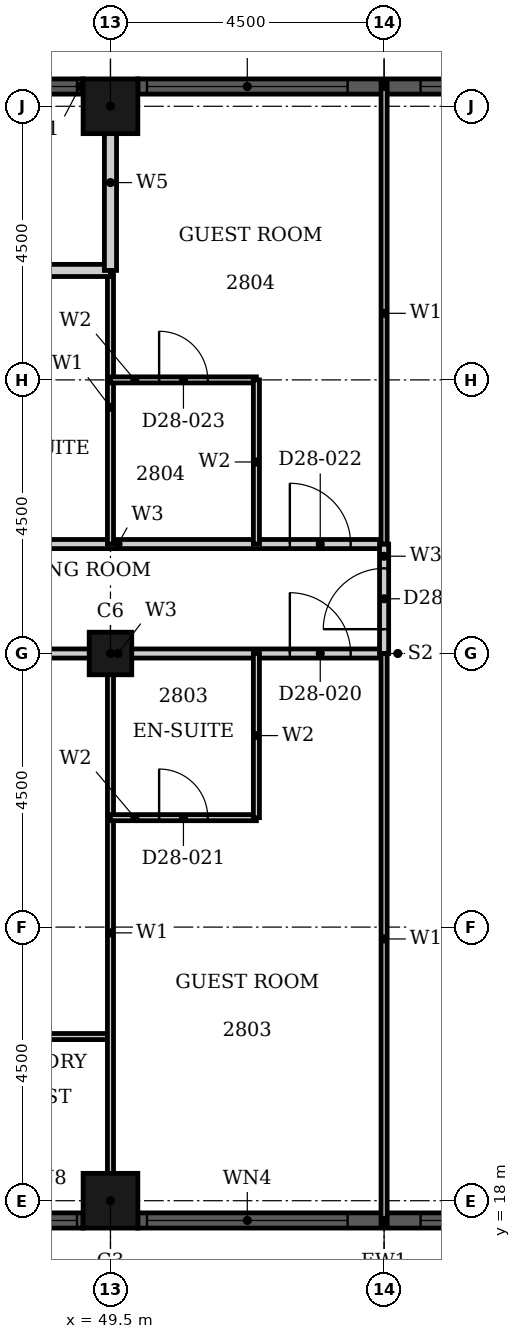
"""IFC4 building model, lengths in metres.
Left out: names, types, materials, properties, quantities, classifications, styles, units other than length and angle.
Written with IfcOpenShell. Run it as: python <this file> out.ifc"""

import sys

from ifc_helpers import new_model, si_unit, direction, frame, frame_2d, origin, origin_2d, place, context, subcontext, project, spatial, rectangle, hollow_rectangle, extrude, element, fill, save


model = new_model("IFC4")
c1 = context("Model", 3, precision=1e-05, world=origin(), true_north=direction((0.0, 1.0)))
c2 = subcontext(c1, "Body", "Model", "MODEL_VIEW")
j1 = project(units=[si_unit("LENGTHUNIT", "METRE"), si_unit("PLANEANGLEUNIT", "RADIAN")], contexts=[c1])
p1 = place(None, origin())
s1 = spatial("IfcSite", under=j1, at=p1, CompositionType="ELEMENT")
p2 = place(p1, origin())
s2 = spatial("IfcBuilding", under=s1, at=p2, CompositionType="ELEMENT")
p3 = place(p2, frame((0.0, 0.0, 115.2)))
s3 = spatial("IfcBuildingStorey", under=s2, at=p3, CompositionType="ELEMENT", Elevation=115.2)
for number, where, z_axis, x_axis in (
    (1, (49.5, 18.0, 0.0), (0.0, 0.0, 1.0), (1.0, 0.0, 0.0)),
    (2, (49.5, 36.0, 0.0), (0.0, 0.0, 1.0), (1.0, 0.0, 0.0)),
):
    element("IfcColumn", number, at=place(p3, frame(where, z_axis=z_axis, x_axis=x_axis)), inside=s3, PredefinedType="COLUMN", context=c2, shape_type="SweptSolid", body=[
        extrude(hollow_rectangle(XDim=0.9, YDim=0.9, WallThickness=0.028, at=origin_2d()), origin(), (0.0, 0.0, 1.0), 3.6),
    ])
p4 = place(p3, frame((49.5, 27.0, 0.0), z_axis=(0.0, 0.0, 1.0), x_axis=(1.0, 0.0, 0.0)))
e3 = element("IfcColumn", 3, at=p4, inside=s3, PredefinedType="COLUMN", context=c2, shape_type="SweptSolid", body=[
    extrude(hollow_rectangle(XDim=0.7, YDim=0.7, WallThickness=0.022, at=origin_2d()), origin(), (0.0, 0.0, 1.0), 3.6),
])
p5 = place(p3, frame((47.7, 17.675, 0.0), z_axis=(0.0, 0.0, 1.0), x_axis=(1.0, 0.0, 0.0)))
e4 = element("IfcWall", 4, at=p5, inside=s3, PredefinedType="SOLIDWALL", context=c2, shape_type="SweptSolid", body=[
    extrude(rectangle(XDim=1.35, YDim=0.25, at=frame_2d((0.675, 0.0))), origin(), (0.0, 0.0, 1.0), 3.6),
])
p6 = place(p5, frame((0.1, 0.0, 0.9)))
e5 = element("IfcOpeningElement", 5, at=p6, cuts=e4, PredefinedType="OPENING", context=c2, shape_type="SweptSolid", body=[
    extrude(rectangle(XDim=1.15, YDim=2.08, at=frame_2d((0.575, 1.04))), frame((0.0, 0.135, 0.0), z_axis=(0.0, -1.0, 0.0), x_axis=(1.0, 0.0, 0.0)), (0.0, 0.0, 1.0), 0.27),
])
p7 = place(p3, frame((49.95, 17.675, 0.0), z_axis=(0.0, 0.0, 1.0), x_axis=(1.0, 0.0, 0.0)))
e6 = element("IfcWall", 6, at=p7, inside=s3, PredefinedType="SOLIDWALL", context=c2, shape_type="SweptSolid", body=[
    extrude(rectangle(XDim=8.1, YDim=0.25, at=frame_2d((4.05, 0.0))), origin(), (0.0, 0.0, 1.0), 3.6),
])
p8 = place(p7, frame((0.15, 0.0, 0.9)))
e7 = element("IfcOpeningElement", 7, at=p8, cuts=e6, PredefinedType="OPENING", context=c2, shape_type="SweptSolid", body=[
    extrude(rectangle(XDim=3.3, YDim=2.08, at=frame_2d((1.65, 1.04))), frame((0.0, 0.135, 0.0), z_axis=(0.0, -1.0, 0.0), x_axis=(1.0, 0.0, 0.0)), (0.0, 0.0, 1.0), 0.27),
])
p9 = place(p7, frame((4.65, 0.0, 0.9)))
e8 = element("IfcOpeningElement", 8, at=p9, cuts=e6, PredefinedType="OPENING", context=c2, shape_type="SweptSolid", body=[
    extrude(rectangle(XDim=3.3, YDim=2.08, at=frame_2d((1.65, 1.04))), frame((0.0, 0.135, 0.0), z_axis=(0.0, -1.0, 0.0), x_axis=(1.0, 0.0, 0.0)), (0.0, 0.0, 1.0), 0.27),
])
p10 = place(p3, frame((58.05, 36.325, 0.0), z_axis=(0.0, 0.0, 1.0), x_axis=(-1.0, 0.0, 0.0)))
e9 = element("IfcWall", 9, at=p10, inside=s3, PredefinedType="SOLIDWALL", context=c2, shape_type="SweptSolid", body=[
    extrude(rectangle(XDim=8.1, YDim=0.25, at=frame_2d((4.05, 0.0))), origin(), (0.0, 0.0, 1.0), 3.6),
])
p11 = place(p10, frame((0.15, 0.0, 0.9)))
e10 = element("IfcOpeningElement", 10, at=p11, cuts=e9, PredefinedType="OPENING", context=c2, shape_type="SweptSolid", body=[
    extrude(rectangle(XDim=3.3, YDim=2.08, at=frame_2d((1.65, 1.04))), frame((0.0, 0.135, 0.0), z_axis=(0.0, -1.0, 0.0), x_axis=(1.0, 0.0, 0.0)), (0.0, 0.0, 1.0), 0.27),
])
p12 = place(p10, frame((4.65, 0.0, 0.9)))
e11 = element("IfcOpeningElement", 11, at=p12, cuts=e9, PredefinedType="OPENING", context=c2, shape_type="SweptSolid", body=[
    extrude(rectangle(XDim=3.3, YDim=2.08, at=frame_2d((1.65, 1.04))), frame((0.0, 0.135, 0.0), z_axis=(0.0, -1.0, 0.0), x_axis=(1.0, 0.0, 0.0)), (0.0, 0.0, 1.0), 0.27),
])
p13 = place(p3, frame((49.05, 36.325, 0.0), z_axis=(0.0, 0.0, 1.0), x_axis=(-1.0, 0.0, 0.0)))
e12 = element("IfcWall", 12, at=p13, inside=s3, PredefinedType="SOLIDWALL", context=c2, shape_type="SweptSolid", body=[
    extrude(rectangle(XDim=1.35, YDim=0.25, at=frame_2d((0.675, 0.0))), origin(), (0.0, 0.0, 1.0), 3.6),
])
p14 = place(p13, frame((0.1, 0.0, 0.9)))
e13 = element("IfcOpeningElement", 13, at=p14, cuts=e12, PredefinedType="OPENING", context=c2, shape_type="SweptSolid", body=[
    extrude(rectangle(XDim=1.15, YDim=2.08, at=frame_2d((0.575, 1.04))), frame((0.0, 0.135, 0.0), z_axis=(0.0, -1.0, 0.0), x_axis=(1.0, 0.0, 0.0)), (0.0, 0.0, 1.0), 0.27),
])
p15 = place(p3, frame((46.8, 27.0, 0.0), z_axis=(0.0, 0.0, 1.0), x_axis=(1.0, 0.0, 0.0)))
e14 = element("IfcWall", 14, at=p15, inside=s3, PredefinedType="PARTITIONING", context=c2, shape_type="SweptSolid", body=[
    extrude(rectangle(XDim=7.2, YDim=0.15, at=frame_2d((3.6, 0.0))), origin(), (0.0, 0.0, 1.0), 2.58),
])
p16 = place(p15, frame((5.65, 0.0, 0.0)))
e15 = element("IfcOpeningElement", 15, at=p16, cuts=e14, PredefinedType="OPENING", context=c2, shape_type="SweptSolid", body=[
    extrude(rectangle(XDim=1.0, YDim=2.1, at=frame_2d((0.5, 1.05))), frame((0.0, 0.085, 0.0), z_axis=(0.0, -1.0, 0.0), x_axis=(1.0, 0.0, 0.0)), (0.0, 0.0, 1.0), 0.17),
])
p17 = place(p3, frame((46.8, 28.8, 0.0), z_axis=(0.0, 0.0, 1.0), x_axis=(1.0, 0.0, 0.0)))
e16 = element("IfcWall", 16, at=p17, inside=s3, PredefinedType="PARTITIONING", context=c2, shape_type="SweptSolid", body=[
    extrude(rectangle(XDim=7.2, YDim=0.15, at=frame_2d((3.6, 0.0))), origin(), (0.0, 0.0, 1.0), 3.3),
])
p18 = place(p17, frame((5.65, 0.0, 0.0)))
e17 = element("IfcOpeningElement", 17, at=p18, cuts=e16, PredefinedType="OPENING", context=c2, shape_type="SweptSolid", body=[
    extrude(rectangle(XDim=1.0, YDim=2.1, at=frame_2d((0.5, 1.05))), frame((0.0, 0.085, 0.0), z_axis=(0.0, -1.0, 0.0), x_axis=(1.0, 0.0, 0.0)), (0.0, 0.0, 1.0), 0.17),
])
p19 = place(p3, frame((54.0, 27.0, 0.0), z_axis=(0.0, 0.0, 1.0), x_axis=(0.0, 1.0, 0.0)))
e18 = element("IfcWall", 18, at=p19, inside=s3, PredefinedType="PARTITIONING", context=c2, shape_type="SweptSolid", body=[
    extrude(rectangle(XDim=1.8, YDim=0.15, at=frame_2d((0.9, 0.0))), origin(), (0.0, 0.0, 1.0), 3.3),
])
p20 = place(p19, frame((0.4, 0.0, 0.0)))
e19 = element("IfcOpeningElement", 19, at=p20, cuts=e18, PredefinedType="OPENING", context=c2, shape_type="SweptSolid", body=[
    extrude(rectangle(XDim=1.0, YDim=2.1, at=frame_2d((0.5, 1.05))), frame((0.0, 0.085, 0.0), z_axis=(0.0, -1.0, 0.0), x_axis=(1.0, 0.0, 0.0)), (0.0, 0.0, 1.0), 0.17),
])
p21 = place(p3, frame((46.8, 20.7, 0.0), z_axis=(0.0, 0.0, 1.0), x_axis=(1.0, 0.0, 0.0)))
e20 = element("IfcWall", 20, at=p21, inside=s3, PredefinedType="PARTITIONING", context=c2, shape_type="SweptSolid", body=[
    extrude(rectangle(XDim=2.7, YDim=0.1, at=frame_2d((1.35, 0.0))), origin(), (0.0, 0.0, 1.0), 3.3),
])
p22 = place(p3, frame((49.5, 28.8, 0.0), z_axis=(0.0, 0.0, 1.0), x_axis=(0.0, 1.0, 0.0)))
e21 = element("IfcWall", 21, at=p22, inside=s3, PredefinedType="PARTITIONING", context=c2, shape_type="SweptSolid", body=[
    extrude(rectangle(XDim=4.5, YDim=0.1, at=frame_2d((2.25, 0.0))), origin(), (0.0, 0.0, 1.0), 2.38),
])
p23 = place(p3, frame((49.5, 17.81, 0.0), z_axis=(0.0, 0.0, 1.0), x_axis=(0.0, 1.0, 0.0)))
e22 = element("IfcWall", 22, at=p23, inside=s3, PredefinedType="PARTITIONING", context=c2, shape_type="SweptSolid", body=[
    extrude(rectangle(XDim=9.19, YDim=0.1, at=frame_2d((4.595, 0.0))), origin(), (0.0, 0.0, 1.0), 2.38),
])
p24 = place(p3, frame((54.0, 28.8, 0.0), z_axis=(0.0, 0.0, 1.0), x_axis=(0.0, 1.0, 0.0)))
e23 = element("IfcWall", 23, at=p24, inside=s3, PredefinedType="PARTITIONING", context=c2, shape_type="SweptSolid", body=[
    extrude(rectangle(XDim=7.59, YDim=0.1, at=frame_2d((3.795, 0.0))), origin(), (0.0, 0.0, 1.0), 3.3),
])
p25 = place(p3, frame((54.0, 17.61, 0.0), z_axis=(0.0, 0.0, 1.0), x_axis=(0.0, 1.0, 0.0)))
e24 = element("IfcWall", 24, at=p25, inside=s3, PredefinedType="PARTITIONING", context=c2, shape_type="SweptSolid", body=[
    extrude(rectangle(XDim=9.39, YDim=0.1, at=frame_2d((4.695, 0.0))), origin(), (0.0, 0.0, 1.0), 3.3),
])
p26 = place(p3, frame((49.5, 24.3, 0.0), z_axis=(0.0, 0.0, 1.0), x_axis=(1.0, 0.0, 0.0)))
e25 = element("IfcWall", 25, at=p26, inside=s3, PredefinedType="PARTITIONING", context=c2, shape_type="SweptSolid", body=[
    extrude(rectangle(XDim=2.4, YDim=0.1, at=frame_2d((1.2, 0.0))), origin(), (0.0, 0.0, 1.0), 3.3),
])
p27 = place(p26, frame((0.8, 0.0, 0.0)))
e26 = element("IfcOpeningElement", 26, at=p27, cuts=e25, PredefinedType="OPENING", context=c2, shape_type="SweptSolid", body=[
    extrude(rectangle(XDim=0.8, YDim=2.1, at=frame_2d((0.4, 1.05))), frame((0.0, 0.06, 0.0), z_axis=(0.0, -1.0, 0.0), x_axis=(1.0, 0.0, 0.0)), (0.0, 0.0, 1.0), 0.12),
])
p28 = place(p3, frame((49.5, 31.5, 0.0), z_axis=(0.0, 0.0, 1.0), x_axis=(1.0, 0.0, 0.0)))
e27 = element("IfcWall", 27, at=p28, inside=s3, PredefinedType="PARTITIONING", context=c2, shape_type="SweptSolid", body=[
    extrude(rectangle(XDim=2.4, YDim=0.1, at=frame_2d((1.2, 0.0))), origin(), (0.0, 0.0, 1.0), 2.58),
])
p29 = place(p28, frame((0.8, 0.0, 0.0)))
e28 = element("IfcOpeningElement", 28, at=p29, cuts=e27, PredefinedType="OPENING", context=c2, shape_type="SweptSolid", body=[
    extrude(rectangle(XDim=0.8, YDim=2.1, at=frame_2d((0.4, 1.05))), frame((0.0, 0.06, 0.0), z_axis=(0.0, -1.0, 0.0), x_axis=(1.0, 0.0, 0.0)), (0.0, 0.0, 1.0), 0.12),
])
for number, where, z_axis, x_axis in (
    (29, (51.9, 28.8, 0.0), (0.0, 0.0, 1.0), (0.0, 1.0, 0.0)),
    (30, (51.9, 24.3, 0.0), (0.0, 0.0, 1.0), (0.0, 1.0, 0.0)),
):
    element("IfcWall", number, at=place(p3, frame(where, z_axis=z_axis, x_axis=x_axis)), inside=s3, PredefinedType="PARTITIONING", context=c2, shape_type="SweptSolid", body=[
        extrude(rectangle(XDim=2.7, YDim=0.1, at=frame_2d((1.35, 0.0))), origin(), (0.0, 0.0, 1.0), 3.3),
    ])
p30 = place(p3, frame((45.0, 33.3, 0.0), z_axis=(0.0, 0.0, 1.0), x_axis=(1.0, 0.0, 0.0)))
e31 = element("IfcWall", 31, at=p30, inside=s3, PredefinedType="PARTITIONING", context=c2, shape_type="SweptSolid", body=[
    extrude(rectangle(XDim=4.5, YDim=0.2, at=frame_2d((2.25, 0.0))), origin(), (0.0, 0.0, 1.0), 3.3),
])
p31 = place(p30, frame((0.45, 0.0, 0.0)))
e32 = element("IfcOpeningElement", 32, at=p31, cuts=e31, PredefinedType="OPENING", context=c2, shape_type="SweptSolid", body=[
    extrude(rectangle(XDim=0.9, YDim=2.1, at=frame_2d((0.45, 1.05))), frame((0.0, 0.11, 0.0), z_axis=(0.0, -1.0, 0.0), x_axis=(1.0, 0.0, 0.0)), (0.0, 0.0, 1.0), 0.22),
])
p32 = place(p3, frame((49.5, 33.3, 0.0), z_axis=(0.0, 0.0, 1.0), x_axis=(0.0, 1.0, 0.0)))
e33 = element("IfcWall", 33, at=p32, inside=s3, PredefinedType="PARTITIONING", context=c2, shape_type="SweptSolid", body=[
    extrude(rectangle(XDim=2.89, YDim=0.2, at=frame_2d((1.445, 0.0))), origin(), (0.0, 0.0, 1.0), 2.38),
])
p33 = place(p6, origin())
e34 = element("IfcWindow", 34, at=p33, inside=s3, PartitioningType="SINGLE_PANEL", PredefinedType="WINDOW", context=c2, shape_type="SweptSolid", body=[
    extrude(rectangle(XDim=1.15, YDim=2.08, at=frame_2d((0.575, 1.04))), frame((0.0, 0.03, 0.0), z_axis=(0.0, -1.0, 0.0), x_axis=(1.0, 0.0, 0.0)), (0.0, 0.0, 1.0), 0.06),
])
fill(e5, e34)
p34 = place(p8, origin())
e35 = element("IfcWindow", 35, at=p34, inside=s3, PartitioningType="SINGLE_PANEL", PredefinedType="WINDOW", context=c2, shape_type="SweptSolid", body=[
    extrude(rectangle(XDim=3.3, YDim=2.08, at=frame_2d((1.65, 1.04))), frame((0.0, 0.03, 0.0), z_axis=(0.0, -1.0, 0.0), x_axis=(1.0, 0.0, 0.0)), (0.0, 0.0, 1.0), 0.06),
])
fill(e7, e35)
p35 = place(p9, origin())
e36 = element("IfcWindow", 36, at=p35, inside=s3, PartitioningType="SINGLE_PANEL", PredefinedType="WINDOW", context=c2, shape_type="SweptSolid", body=[
    extrude(rectangle(XDim=3.3, YDim=2.08, at=frame_2d((1.65, 1.04))), frame((0.0, 0.03, 0.0), z_axis=(0.0, -1.0, 0.0), x_axis=(1.0, 0.0, 0.0)), (0.0, 0.0, 1.0), 0.06),
])
fill(e8, e36)
p36 = place(p11, origin())
e37 = element("IfcWindow", 37, at=p36, inside=s3, PartitioningType="SINGLE_PANEL", PredefinedType="WINDOW", context=c2, shape_type="SweptSolid", body=[
    extrude(rectangle(XDim=3.3, YDim=2.08, at=frame_2d((1.65, 1.04))), frame((0.0, 0.03, 0.0), z_axis=(0.0, -1.0, 0.0), x_axis=(1.0, 0.0, 0.0)), (0.0, 0.0, 1.0), 0.06),
])
fill(e10, e37)
p37 = place(p12, origin())
e38 = element("IfcWindow", 38, at=p37, inside=s3, PartitioningType="SINGLE_PANEL", PredefinedType="WINDOW", context=c2, shape_type="SweptSolid", body=[
    extrude(rectangle(XDim=3.3, YDim=2.08, at=frame_2d((1.65, 1.04))), frame((0.0, 0.03, 0.0), z_axis=(0.0, -1.0, 0.0), x_axis=(1.0, 0.0, 0.0)), (0.0, 0.0, 1.0), 0.06),
])
fill(e11, e38)
p38 = place(p14, origin())
e39 = element("IfcWindow", 39, at=p38, inside=s3, PartitioningType="SINGLE_PANEL", PredefinedType="WINDOW", context=c2, shape_type="SweptSolid", body=[
    extrude(rectangle(XDim=1.15, YDim=2.08, at=frame_2d((0.575, 1.04))), frame((0.0, 0.03, 0.0), z_axis=(0.0, -1.0, 0.0), x_axis=(1.0, 0.0, 0.0)), (0.0, 0.0, 1.0), 0.06),
])
fill(e13, e39)
p39 = place(p16, origin())
e40 = element("IfcDoor", 40, at=p39, inside=s3, OperationType="SINGLE_SWING_RIGHT", PredefinedType="DOOR", context=c2, shape_type="SweptSolid", body=[
    extrude(rectangle(XDim=1.0, YDim=2.1, at=frame_2d((0.5, 1.05))), frame((0.0, 0.025, 0.0), z_axis=(0.0, -1.0, 0.0), x_axis=(1.0, 0.0, 0.0)), (0.0, 0.0, 1.0), 0.05),
])
fill(e15, e40)
p40 = place(p27, origin())
e41 = element("IfcDoor", 41, at=p40, inside=s3, OperationType="SINGLE_SWING_RIGHT", PredefinedType="DOOR", context=c2, shape_type="SweptSolid", body=[
    extrude(rectangle(XDim=0.8, YDim=2.1, at=frame_2d((0.4, 1.05))), frame((0.0, 0.025, 0.0), z_axis=(0.0, -1.0, 0.0), x_axis=(1.0, 0.0, 0.0)), (0.0, 0.0, 1.0), 0.05),
])
fill(e26, e41)
p41 = place(p18, origin())
e42 = element("IfcDoor", 42, at=p41, inside=s3, OperationType="SINGLE_SWING_RIGHT", PredefinedType="DOOR", context=c2, shape_type="SweptSolid", body=[
    extrude(rectangle(XDim=1.0, YDim=2.1, at=frame_2d((0.5, 1.05))), frame((0.0, 0.025, 0.0), z_axis=(0.0, -1.0, 0.0), x_axis=(1.0, 0.0, 0.0)), (0.0, 0.0, 1.0), 0.05),
])
fill(e17, e42)
p42 = place(p29, origin())
e43 = element("IfcDoor", 43, at=p42, inside=s3, OperationType="SINGLE_SWING_RIGHT", PredefinedType="DOOR", context=c2, shape_type="SweptSolid", body=[
    extrude(rectangle(XDim=0.8, YDim=2.1, at=frame_2d((0.4, 1.05))), frame((0.0, 0.025, 0.0), z_axis=(0.0, -1.0, 0.0), x_axis=(1.0, 0.0, 0.0)), (0.0, 0.0, 1.0), 0.05),
])
fill(e28, e43)
p43 = place(p20, origin())
e44 = element("IfcDoor", 44, at=p43, inside=s3, OperationType="SINGLE_SWING_RIGHT", PredefinedType="DOOR", context=c2, shape_type="SweptSolid", body=[
    extrude(rectangle(XDim=1.0, YDim=2.1, at=frame_2d((0.5, 1.05))), frame((0.0, 0.025, 0.0), z_axis=(0.0, -1.0, 0.0), x_axis=(1.0, 0.0, 0.0)), (0.0, 0.0, 1.0), 0.05),
])
fill(e19, e44)
save(model, sys.argv[1])
